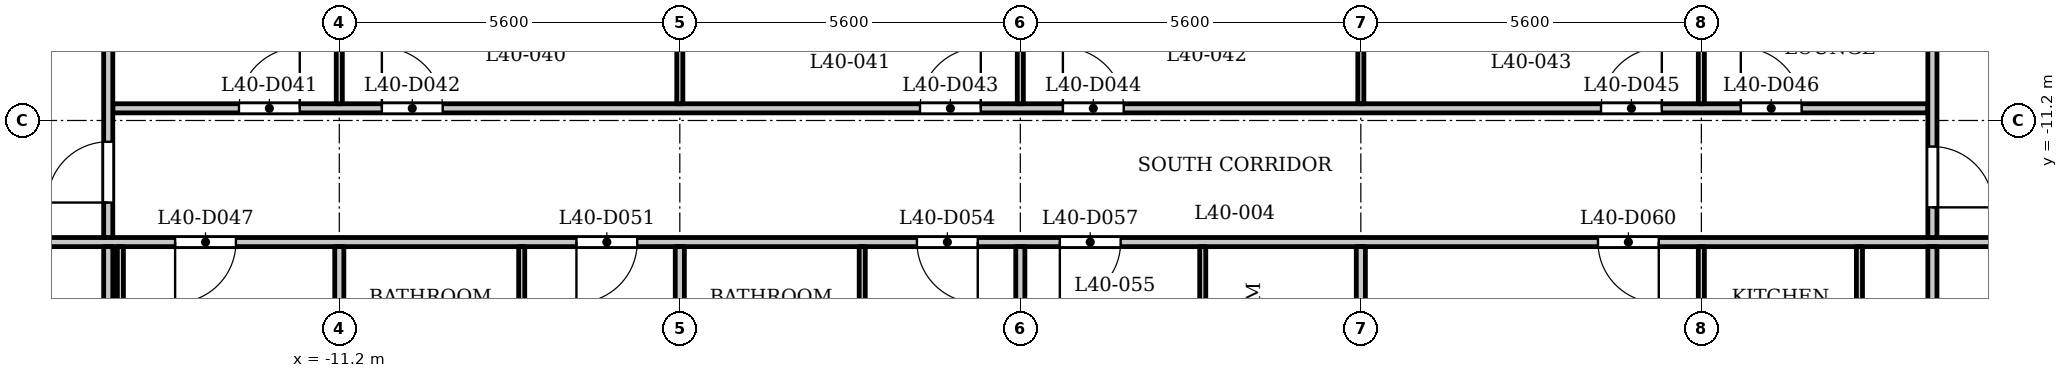
"""IFC4 building model, lengths in metres.
Left out: names, types, materials, properties, quantities, classifications, styles, units other than length and angle.
Written with IfcOpenShell. Run it as: python <this file> out.ifc"""

import sys

from ifc_helpers import new_model, si_unit, direction, frame, frame_2d, origin, place, context, subcontext, project, spatial, rectangle, extrude, element, fill, save


model = new_model("IFC4")
c1 = context("Model", 3, precision=1e-05, world=origin(), true_north=direction((0.0, 1.0)))
c2 = subcontext(c1, "Body", "Model", "MODEL_VIEW")
j1 = project(units=[si_unit("LENGTHUNIT", "METRE"), si_unit("PLANEANGLEUNIT", "RADIAN")], contexts=[c1])
p1 = place(None, origin())
s1 = spatial("IfcSite", under=j1, at=p1, CompositionType="ELEMENT")
p2 = place(p1, origin())
s2 = spatial("IfcBuilding", under=s1, at=p2, CompositionType="ELEMENT")
p3 = place(p2, frame((0.0, 0.0, 157.1)))
s3 = spatial("IfcBuildingStorey", under=s2, at=p3, CompositionType="ELEMENT", Elevation=157.1)
p4 = place(p3, frame((-17.4, -13.2, 0.0), z_axis=(0.0, 0.0, 1.0), x_axis=(1.0, 0.0, 0.0)))
e1 = element("IfcWall", 1, at=p4, inside=s3, PredefinedType="PARTITIONING", context=c2, shape_type="SweptSolid", body=[
    extrude(rectangle(XDim=34.8, YDim=0.15, at=frame_2d((17.4, 0.0))), origin(), (0.0, 0.0, 1.0), 3.2),
])
p5 = place(p4, frame((0.15, 0.0, 0.0)))
e2 = element("IfcOpeningElement", 2, at=p5, cuts=e1, PredefinedType="OPENING", context=c2, shape_type="SweptSolid", body=[
    extrude(rectangle(XDim=1.0, YDim=2.1, at=frame_2d((0.5, 1.05))), frame((0.0, 0.085, 0.0), z_axis=(0.0, -1.0, 0.0), x_axis=(1.0, 0.0, 0.0)), (0.0, 0.0, 1.0), 0.17),
])
p6 = place(p4, frame((33.55, 0.0, 0.0)))
e3 = element("IfcOpeningElement", 3, at=p6, cuts=e1, PredefinedType="OPENING", context=c2, shape_type="SweptSolid", body=[
    extrude(rectangle(XDim=1.0, YDim=2.1, at=frame_2d((0.5, 1.05))), frame((0.0, 0.085, 0.0), z_axis=(0.0, -1.0, 0.0), x_axis=(1.0, 0.0, 0.0)), (0.0, 0.0, 1.0), 0.17),
])
p7 = place(p4, frame((3.5, 0.0, 0.0)))
e4 = element("IfcOpeningElement", 4, at=p7, cuts=e1, PredefinedType="OPENING", context=c2, shape_type="SweptSolid", body=[
    extrude(rectangle(XDim=1.0, YDim=2.1, at=frame_2d((0.5, 1.05))), frame((0.0, 0.085, 0.0), z_axis=(0.0, -1.0, 0.0), x_axis=(1.0, 0.0, 0.0)), (0.0, 0.0, 1.0), 0.17),
])
p8 = place(p4, frame((10.1, 0.0, 0.0)))
e5 = element("IfcOpeningElement", 5, at=p8, cuts=e1, PredefinedType="OPENING", context=c2, shape_type="SweptSolid", body=[
    extrude(rectangle(XDim=1.0, YDim=2.1, at=frame_2d((0.5, 1.05))), frame((0.0, 0.085, 0.0), z_axis=(0.0, -1.0, 0.0), x_axis=(1.0, 0.0, 0.0)), (0.0, 0.0, 1.0), 0.17),
])
p9 = place(p4, frame((15.7, 0.0, 0.0)))
e6 = element("IfcOpeningElement", 6, at=p9, cuts=e1, PredefinedType="OPENING", context=c2, shape_type="SweptSolid", body=[
    extrude(rectangle(XDim=1.0, YDim=2.1, at=frame_2d((0.5, 1.05))), frame((0.0, 0.085, 0.0), z_axis=(0.0, -1.0, 0.0), x_axis=(1.0, 0.0, 0.0)), (0.0, 0.0, 1.0), 0.17),
])
p10 = place(p4, frame((18.05, 0.0, 0.0)))
e7 = element("IfcOpeningElement", 7, at=p10, cuts=e1, PredefinedType="OPENING", context=c2, shape_type="SweptSolid", body=[
    extrude(rectangle(XDim=1.0, YDim=2.1, at=frame_2d((0.5, 1.05))), frame((0.0, 0.085, 0.0), z_axis=(0.0, -1.0, 0.0), x_axis=(1.0, 0.0, 0.0)), (0.0, 0.0, 1.0), 0.17),
])
p11 = place(p4, frame((26.9, 0.0, 0.0)))
e8 = element("IfcOpeningElement", 8, at=p11, cuts=e1, PredefinedType="OPENING", context=c2, shape_type="SweptSolid", body=[
    extrude(rectangle(XDim=1.0, YDim=2.1, at=frame_2d((0.5, 1.05))), frame((0.0, 0.085, 0.0), z_axis=(0.0, -1.0, 0.0), x_axis=(1.0, 0.0, 0.0)), (0.0, 0.0, 1.0), 0.17),
])
p12 = place(p3, frame((-14.925, -11.0, 0.0), z_axis=(0.0, 0.0, 1.0), x_axis=(1.0, 0.0, 0.0)))
e9 = element("IfcWall", 9, at=p12, inside=s3, PredefinedType="PARTITIONING", context=c2, shape_type="SweptSolid", body=[
    extrude(rectangle(XDim=29.85, YDim=0.15, at=frame_2d((14.925, 0.0))), origin(), (0.0, 0.0, 1.0), 3.2),
])
p13 = place(p12, frame((2.075, 0.0, 0.0)))
e10 = element("IfcOpeningElement", 10, at=p13, cuts=e9, PredefinedType="OPENING", context=c2, shape_type="SweptSolid", body=[
    extrude(rectangle(XDim=1.0, YDim=2.1, at=frame_2d((0.5, 1.05))), frame((0.0, 0.085, 0.0), z_axis=(0.0, -1.0, 0.0), x_axis=(1.0, 0.0, 0.0)), (0.0, 0.0, 1.0), 0.17),
])
p14 = place(p12, frame((4.425, 0.0, 0.0)))
e11 = element("IfcOpeningElement", 11, at=p14, cuts=e9, PredefinedType="OPENING", context=c2, shape_type="SweptSolid", body=[
    extrude(rectangle(XDim=1.0, YDim=2.1, at=frame_2d((0.5, 1.05))), frame((0.0, 0.085, 0.0), z_axis=(0.0, -1.0, 0.0), x_axis=(1.0, 0.0, 0.0)), (0.0, 0.0, 1.0), 0.17),
])
p15 = place(p12, frame((13.275, 0.0, 0.0)))
e12 = element("IfcOpeningElement", 12, at=p15, cuts=e9, PredefinedType="OPENING", context=c2, shape_type="SweptSolid", body=[
    extrude(rectangle(XDim=1.0, YDim=2.1, at=frame_2d((0.5, 1.05))), frame((0.0, 0.085, 0.0), z_axis=(0.0, -1.0, 0.0), x_axis=(1.0, 0.0, 0.0)), (0.0, 0.0, 1.0), 0.17),
])
p16 = place(p12, frame((15.625, 0.0, 0.0)))
e13 = element("IfcOpeningElement", 13, at=p16, cuts=e9, PredefinedType="OPENING", context=c2, shape_type="SweptSolid", body=[
    extrude(rectangle(XDim=1.0, YDim=2.1, at=frame_2d((0.5, 1.05))), frame((0.0, 0.085, 0.0), z_axis=(0.0, -1.0, 0.0), x_axis=(1.0, 0.0, 0.0)), (0.0, 0.0, 1.0), 0.17),
])
p17 = place(p12, frame((24.475, 0.0, 0.0)))
e14 = element("IfcOpeningElement", 14, at=p17, cuts=e9, PredefinedType="OPENING", context=c2, shape_type="SweptSolid", body=[
    extrude(rectangle(XDim=1.0, YDim=2.1, at=frame_2d((0.5, 1.05))), frame((0.0, 0.085, 0.0), z_axis=(0.0, -1.0, 0.0), x_axis=(1.0, 0.0, 0.0)), (0.0, 0.0, 1.0), 0.17),
])
p18 = place(p12, frame((26.774, 0.0, 0.0)))
e15 = element("IfcOpeningElement", 15, at=p18, cuts=e9, PredefinedType="OPENING", context=c2, shape_type="SweptSolid", body=[
    extrude(rectangle(XDim=1.0, YDim=2.1, at=frame_2d((0.5, 1.05))), frame((0.0, 0.085, 0.0), z_axis=(0.0, -1.0, 0.0), x_axis=(1.0, 0.0, 0.0)), (0.0, 0.0, 1.0), 0.17),
])
p19 = place(p3, frame((-15.0, -15.325, 0.0), z_axis=(0.0, 0.0, 1.0), x_axis=(0.0, 1.0, 0.0)))
e16 = element("IfcWall", 16, at=p19, inside=s3, PredefinedType="PARTITIONING", context=c2, shape_type="SweptSolid", body=[
    extrude(rectangle(XDim=2.05, YDim=0.15, at=frame_2d((1.025, 0.0))), origin(), (0.0, 0.0, 1.0), 3.2),
])
p20 = place(p3, frame((-15.0, -13.125, 0.0), z_axis=(0.0, 0.0, 1.0), x_axis=(0.0, 1.0, 0.0)))
e17 = element("IfcWall", 17, at=p20, inside=s3, PredefinedType="PARTITIONING", context=c2, shape_type="SweptSolid", body=[
    extrude(rectangle(XDim=6.356, YDim=0.15, at=frame_2d((3.178, 0.0))), origin(), (0.0, 0.0, 1.0), 3.2),
])
p21 = place(p20, frame((0.575, 0.0, 0.0)))
e18 = element("IfcOpeningElement", 18, at=p21, cuts=e17, PredefinedType="OPENING", context=c2, shape_type="SweptSolid", body=[
    extrude(rectangle(XDim=1.0, YDim=2.1, at=frame_2d((0.5, 1.05))), frame((0.0, 0.085, 0.0), z_axis=(0.0, -1.0, 0.0), x_axis=(1.0, 0.0, 0.0)), (0.0, 0.0, 1.0), 0.17),
])
p22 = place(p3, frame((-14.8, -17.05, 0.0), z_axis=(0.0, 0.0, 1.0), x_axis=(0.0, 1.0, 0.0)))
e19 = element("IfcWall", 19, at=p22, inside=s3, PredefinedType="PARTITIONING", context=c2, shape_type="SweptSolid", body=[
    extrude(rectangle(XDim=3.775, YDim=0.1, at=frame_2d((1.888, 0.0))), origin(), (0.0, 0.0, 1.0), 3.2),
])
p23 = place(p3, frame((-11.2, -10.925, 0.0), z_axis=(0.0, 0.0, 1.0), x_axis=(0.0, 1.0, 0.0)))
e20 = element("IfcWall", 20, at=p23, inside=s3, PredefinedType="PARTITIONING", context=c2, shape_type="SweptSolid", body=[
    extrude(rectangle(XDim=3.605, YDim=0.1, at=frame_2d((1.802, 0.0))), origin(), (0.0, 0.0, 1.0), 3.2),
])
p24 = place(p3, frame((-11.2, -17.05, 0.0), z_axis=(0.0, 0.0, 1.0), x_axis=(0.0, 1.0, 0.0)))
e21 = element("IfcWall", 21, at=p24, inside=s3, PredefinedType="PARTITIONING", context=c2, shape_type="SweptSolid", body=[
    extrude(rectangle(XDim=3.775, YDim=0.15, at=frame_2d((1.888, 0.0))), origin(), (0.0, 0.0, 1.0), 3.2),
])
p25 = place(p3, frame((-8.2, -17.05, 0.0), z_axis=(0.0, 0.0, 1.0), x_axis=(0.0, 1.0, 0.0)))
e22 = element("IfcWall", 22, at=p25, inside=s3, PredefinedType="PARTITIONING", context=c2, shape_type="SweptSolid", body=[
    extrude(rectangle(XDim=3.775, YDim=0.1, at=frame_2d((1.888, 0.0))), origin(), (0.0, 0.0, 1.0), 3.2),
])
p26 = place(p3, frame((-5.6, -10.925, 0.0), z_axis=(0.0, 0.0, 1.0), x_axis=(0.0, 1.0, 0.0)))
e23 = element("IfcWall", 23, at=p26, inside=s3, PredefinedType="PARTITIONING", context=c2, shape_type="SweptSolid", body=[
    extrude(rectangle(XDim=3.605, YDim=0.1, at=frame_2d((1.802, 0.0))), origin(), (0.0, 0.0, 1.0), 3.2),
])
p27 = place(p3, frame((-5.6, -17.05, 0.0), z_axis=(0.0, 0.0, 1.0), x_axis=(0.0, 1.0, 0.0)))
e24 = element("IfcWall", 24, at=p27, inside=s3, PredefinedType="PARTITIONING", context=c2, shape_type="SweptSolid", body=[
    extrude(rectangle(XDim=3.775, YDim=0.15, at=frame_2d((1.888, 0.0))), origin(), (0.0, 0.0, 1.0), 3.2),
])
p28 = place(p3, frame((-2.6, -17.05, 0.0), z_axis=(0.0, 0.0, 1.0), x_axis=(0.0, 1.0, 0.0)))
e25 = element("IfcWall", 25, at=p28, inside=s3, PredefinedType="PARTITIONING", context=c2, shape_type="SweptSolid", body=[
    extrude(rectangle(XDim=3.775, YDim=0.1, at=frame_2d((1.888, 0.0))), origin(), (0.0, 0.0, 1.0), 3.2),
])
p29 = place(p3, frame((0.0, -10.925, 0.0), z_axis=(0.0, 0.0, 1.0), x_axis=(0.0, 1.0, 0.0)))
e26 = element("IfcWall", 26, at=p29, inside=s3, PredefinedType="PARTITIONING", context=c2, shape_type="SweptSolid", body=[
    extrude(rectangle(XDim=3.605, YDim=0.1, at=frame_2d((1.802, 0.0))), origin(), (0.0, 0.0, 1.0), 3.2),
])
p30 = place(p3, frame((0.0, -17.05, 0.0), z_axis=(0.0, 0.0, 1.0), x_axis=(0.0, 1.0, 0.0)))
e27 = element("IfcWall", 27, at=p30, inside=s3, PredefinedType="PARTITIONING", context=c2, shape_type="SweptSolid", body=[
    extrude(rectangle(XDim=3.775, YDim=0.15, at=frame_2d((1.888, 0.0))), origin(), (0.0, 0.0, 1.0), 3.2),
])
p31 = place(p3, frame((3.0, -17.05, 0.0), z_axis=(0.0, 0.0, 1.0), x_axis=(0.0, 1.0, 0.0)))
e28 = element("IfcWall", 28, at=p31, inside=s3, PredefinedType="PARTITIONING", context=c2, shape_type="SweptSolid", body=[
    extrude(rectangle(XDim=3.775, YDim=0.1, at=frame_2d((1.888, 0.0))), origin(), (0.0, 0.0, 1.0), 3.2),
])
p32 = place(p3, frame((5.6, -10.925, 0.0), z_axis=(0.0, 0.0, 1.0), x_axis=(0.0, 1.0, 0.0)))
e29 = element("IfcWall", 29, at=p32, inside=s3, PredefinedType="PARTITIONING", context=c2, shape_type="SweptSolid", body=[
    extrude(rectangle(XDim=3.605, YDim=0.1, at=frame_2d((1.802, 0.0))), origin(), (0.0, 0.0, 1.0), 3.2),
])
p33 = place(p3, frame((5.6, -17.05, 0.0), z_axis=(0.0, 0.0, 1.0), x_axis=(0.0, 1.0, 0.0)))
e30 = element("IfcWall", 30, at=p33, inside=s3, PredefinedType="PARTITIONING", context=c2, shape_type="SweptSolid", body=[
    extrude(rectangle(XDim=3.775, YDim=0.15, at=frame_2d((1.888, 0.0))), origin(), (0.0, 0.0, 1.0), 3.2),
])
p34 = place(p3, frame((11.2, -17.05, 0.0), z_axis=(0.0, 0.0, 1.0), x_axis=(0.0, 1.0, 0.0)))
e31 = element("IfcWall", 31, at=p34, inside=s3, PredefinedType="PARTITIONING", context=c2, shape_type="SweptSolid", body=[
    extrude(rectangle(XDim=3.775, YDim=0.1, at=frame_2d((1.888, 0.0))), origin(), (0.0, 0.0, 1.0), 3.2),
])
p35 = place(p34, frame((0.1, 0.0, 0.0)))
e32 = element("IfcOpeningElement", 32, at=p35, cuts=e31, PredefinedType="OPENING", context=c2, shape_type="SweptSolid", body=[
    extrude(rectangle(XDim=0.9, YDim=2.1, at=frame_2d((0.45, 1.05))), frame((0.0, 0.06, 0.0), z_axis=(0.0, -1.0, 0.0), x_axis=(1.0, 0.0, 0.0)), (0.0, 0.0, 1.0), 0.12),
])
p36 = place(p3, frame((11.2, -10.925, 0.0), z_axis=(0.0, 0.0, 1.0), x_axis=(0.0, 1.0, 0.0)))
e33 = element("IfcWall", 33, at=p36, inside=s3, PredefinedType="PARTITIONING", context=c2, shape_type="SweptSolid", body=[
    extrude(rectangle(XDim=3.605, YDim=0.1, at=frame_2d((1.802, 0.0))), origin(), (0.0, 0.0, 1.0), 3.2),
])
p37 = place(p3, frame((13.8, -17.05, 0.0), z_axis=(0.0, 0.0, 1.0), x_axis=(0.0, 1.0, 0.0)))
e34 = element("IfcWall", 34, at=p37, inside=s3, PredefinedType="PARTITIONING", context=c2, shape_type="SweptSolid", body=[
    extrude(rectangle(XDim=3.775, YDim=0.1, at=frame_2d((1.888, 0.0))), origin(), (0.0, 0.0, 1.0), 3.2),
])
p38 = place(p3, frame((15.0, -15.325, 0.0), z_axis=(0.0, 0.0, 1.0), x_axis=(0.0, 1.0, 0.0)))
e35 = element("IfcWall", 35, at=p38, inside=s3, PredefinedType="PARTITIONING", context=c2, shape_type="SweptSolid", body=[
    extrude(rectangle(XDim=2.05, YDim=0.15, at=frame_2d((1.025, 0.0))), origin(), (0.0, 0.0, 1.0), 3.2),
])
p39 = place(p3, frame((15.0, -13.125, 0.0), z_axis=(0.0, 0.0, 1.0), x_axis=(0.0, 1.0, 0.0)))
e36 = element("IfcWall", 36, at=p39, inside=s3, PredefinedType="PARTITIONING", context=c2, shape_type="SweptSolid", body=[
    extrude(rectangle(XDim=6.356, YDim=0.15, at=frame_2d((3.178, 0.0))), origin(), (0.0, 0.0, 1.0), 3.2),
])
p40 = place(p39, frame((0.496, 0.0, 0.0)))
e37 = element("IfcOpeningElement", 37, at=p40, cuts=e36, PredefinedType="OPENING", context=c2, shape_type="SweptSolid", body=[
    extrude(rectangle(XDim=1.0, YDim=2.1, at=frame_2d((0.5, 1.05))), frame((0.0, 0.085, 0.0), z_axis=(0.0, -1.0, 0.0), x_axis=(1.0, 0.0, 0.0)), (0.0, 0.0, 1.0), 0.17),
])
p41 = place(p21, origin())
e38 = element("IfcDoor", 38, at=p41, inside=s3, OperationType="SINGLE_SWING_RIGHT", PredefinedType="DOOR", context=c2, shape_type="SweptSolid", body=[
    extrude(rectangle(XDim=1.0, YDim=2.1, at=frame_2d((0.5, 1.05))), frame((0.0, 0.025, 0.0), z_axis=(0.0, -1.0, 0.0), x_axis=(1.0, 0.0, 0.0)), (0.0, 0.0, 1.0), 0.05),
])
fill(e18, e38)
p42 = place(p40, origin())
e39 = element("IfcDoor", 39, at=p42, inside=s3, OperationType="SINGLE_SWING_LEFT", PredefinedType="DOOR", context=c2, shape_type="SweptSolid", body=[
    extrude(rectangle(XDim=1.0, YDim=2.1, at=frame_2d((0.5, 1.05))), frame((0.0, 0.025, 0.0), z_axis=(0.0, -1.0, 0.0), x_axis=(1.0, 0.0, 0.0)), (0.0, 0.0, 1.0), 0.05),
])
fill(e37, e39)
p43 = place(p13, origin())
e40 = element("IfcDoor", 40, at=p43, inside=s3, OperationType="SINGLE_SWING_LEFT", PredefinedType="DOOR", context=c2, shape_type="SweptSolid", body=[
    extrude(rectangle(XDim=1.0, YDim=2.1, at=frame_2d((0.5, 1.05))), frame((0.0, 0.025, 0.0), z_axis=(0.0, -1.0, 0.0), x_axis=(1.0, 0.0, 0.0)), (0.0, 0.0, 1.0), 0.05),
])
fill(e10, e40)
p44 = place(p14, origin())
e41 = element("IfcDoor", 41, at=p44, inside=s3, OperationType="SINGLE_SWING_RIGHT", PredefinedType="DOOR", context=c2, shape_type="SweptSolid", body=[
    extrude(rectangle(XDim=1.0, YDim=2.1, at=frame_2d((0.5, 1.05))), frame((0.0, 0.025, 0.0), z_axis=(0.0, -1.0, 0.0), x_axis=(1.0, 0.0, 0.0)), (0.0, 0.0, 1.0), 0.05),
])
fill(e11, e41)
p45 = place(p15, origin())
e42 = element("IfcDoor", 42, at=p45, inside=s3, OperationType="SINGLE_SWING_LEFT", PredefinedType="DOOR", context=c2, shape_type="SweptSolid", body=[
    extrude(rectangle(XDim=1.0, YDim=2.1, at=frame_2d((0.5, 1.05))), frame((0.0, 0.025, 0.0), z_axis=(0.0, -1.0, 0.0), x_axis=(1.0, 0.0, 0.0)), (0.0, 0.0, 1.0), 0.05),
])
fill(e12, e42)
p46 = place(p16, origin())
e43 = element("IfcDoor", 43, at=p46, inside=s3, OperationType="SINGLE_SWING_RIGHT", PredefinedType="DOOR", context=c2, shape_type="SweptSolid", body=[
    extrude(rectangle(XDim=1.0, YDim=2.1, at=frame_2d((0.5, 1.05))), frame((0.0, 0.025, 0.0), z_axis=(0.0, -1.0, 0.0), x_axis=(1.0, 0.0, 0.0)), (0.0, 0.0, 1.0), 0.05),
])
fill(e13, e43)
p47 = place(p17, origin())
e44 = element("IfcDoor", 44, at=p47, inside=s3, OperationType="SINGLE_SWING_LEFT", PredefinedType="DOOR", context=c2, shape_type="SweptSolid", body=[
    extrude(rectangle(XDim=1.0, YDim=2.1, at=frame_2d((0.5, 1.05))), frame((0.0, 0.025, 0.0), z_axis=(0.0, -1.0, 0.0), x_axis=(1.0, 0.0, 0.0)), (0.0, 0.0, 1.0), 0.05),
])
fill(e14, e44)
p48 = place(p18, origin())
e45 = element("IfcDoor", 45, at=p48, inside=s3, OperationType="SINGLE_SWING_RIGHT", PredefinedType="DOOR", context=c2, shape_type="SweptSolid", body=[
    extrude(rectangle(XDim=1.0, YDim=2.1, at=frame_2d((0.5, 1.05))), frame((0.0, 0.025, 0.0), z_axis=(0.0, -1.0, 0.0), x_axis=(1.0, 0.0, 0.0)), (0.0, 0.0, 1.0), 0.05),
])
fill(e15, e45)
p49 = place(p7, origin())
e46 = element("IfcDoor", 46, at=p49, inside=s3, OperationType="SINGLE_SWING_LEFT", PredefinedType="DOOR", context=c2, shape_type="SweptSolid", body=[
    extrude(rectangle(XDim=1.0, YDim=2.1, at=frame_2d((0.5, 1.05))), frame((0.0, 0.025, 0.0), z_axis=(0.0, -1.0, 0.0), x_axis=(1.0, 0.0, 0.0)), (0.0, 0.0, 1.0), 0.05),
])
fill(e4, e46)
p50 = place(p8, origin())
e47 = element("IfcDoor", 47, at=p50, inside=s3, OperationType="SINGLE_SWING_LEFT", PredefinedType="DOOR", context=c2, shape_type="SweptSolid", body=[
    extrude(rectangle(XDim=1.0, YDim=2.1, at=frame_2d((0.5, 1.05))), frame((0.0, 0.025, 0.0), z_axis=(0.0, -1.0, 0.0), x_axis=(1.0, 0.0, 0.0)), (0.0, 0.0, 1.0), 0.05),
])
fill(e5, e47)
p51 = place(p9, origin())
e48 = element("IfcDoor", 48, at=p51, inside=s3, OperationType="SINGLE_SWING_RIGHT", PredefinedType="DOOR", context=c2, shape_type="SweptSolid", body=[
    extrude(rectangle(XDim=1.0, YDim=2.1, at=frame_2d((0.5, 1.05))), frame((0.0, 0.025, 0.0), z_axis=(0.0, -1.0, 0.0), x_axis=(1.0, 0.0, 0.0)), (0.0, 0.0, 1.0), 0.05),
])
fill(e6, e48)
p52 = place(p10, origin())
e49 = element("IfcDoor", 49, at=p52, inside=s3, OperationType="SINGLE_SWING_LEFT", PredefinedType="DOOR", context=c2, shape_type="SweptSolid", body=[
    extrude(rectangle(XDim=1.0, YDim=2.1, at=frame_2d((0.5, 1.05))), frame((0.0, 0.025, 0.0), z_axis=(0.0, -1.0, 0.0), x_axis=(1.0, 0.0, 0.0)), (0.0, 0.0, 1.0), 0.05),
])
fill(e7, e49)
p53 = place(p11, origin())
e50 = element("IfcDoor", 50, at=p53, inside=s3, OperationType="SINGLE_SWING_RIGHT", PredefinedType="DOOR", context=c2, shape_type="SweptSolid", body=[
    extrude(rectangle(XDim=1.0, YDim=2.1, at=frame_2d((0.5, 1.05))), frame((0.0, 0.025, 0.0), z_axis=(0.0, -1.0, 0.0), x_axis=(1.0, 0.0, 0.0)), (0.0, 0.0, 1.0), 0.05),
])
fill(e8, e50)
save(model, sys.argv[1])
